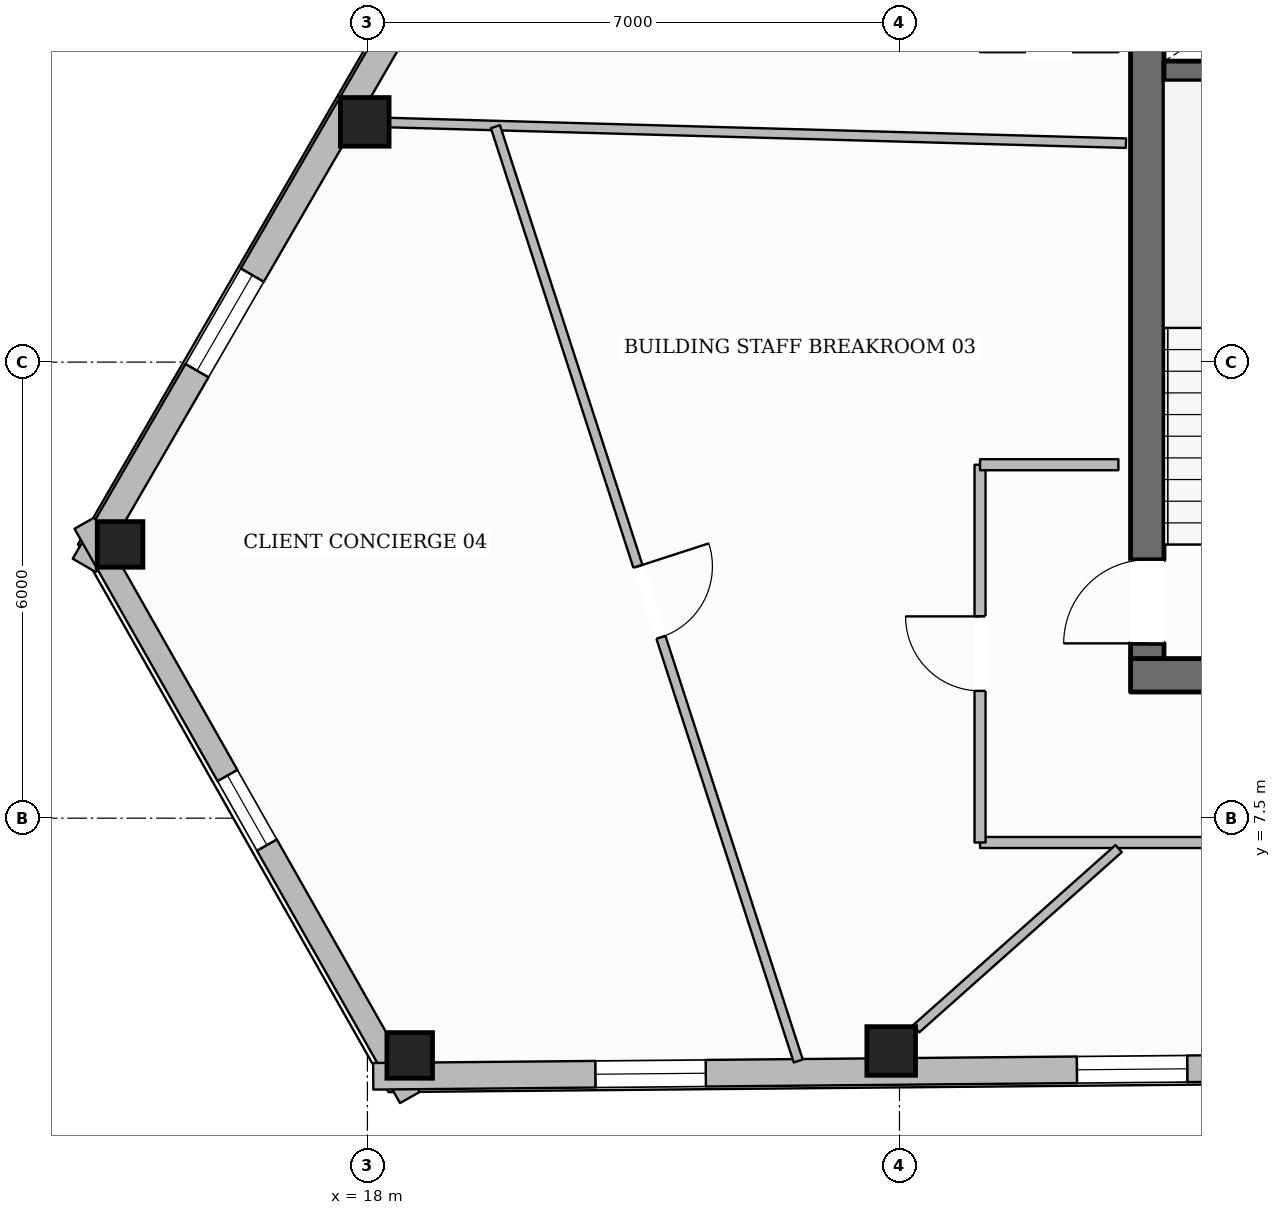
"""IFC4 building model, lengths in metres.
Left out: names, types, materials, properties, quantities, classifications, styles, units other than length and angle.
Written with IfcOpenShell. Run it as: python <this file> out.ifc"""

import sys

from ifc_helpers import new_model, si_unit, direction, frame, frame_2d, origin, origin_2d, place, context, subcontext, project, spatial, rectangle, hollow_rectangle, extrude, element, fill, save


model = new_model("IFC4")
c1 = context("Model", 3, precision=1e-05, world=origin(), true_north=direction((0.0, 1.0)))
c2 = subcontext(c1, "Body", "Model", "MODEL_VIEW")
j1 = project(units=[si_unit("LENGTHUNIT", "METRE"), si_unit("PLANEANGLEUNIT", "RADIAN")], contexts=[c1])
p1 = place(None, origin())
s1 = spatial("IfcSite", under=j1, at=p1, CompositionType="ELEMENT")
p2 = place(p1, origin())
s2 = spatial("IfcBuilding", under=s1, at=p2, CompositionType="ELEMENT")
p3 = place(p2, frame((0.0, 0.0, 222.75)))
s3 = spatial("IfcBuildingStorey", under=s2, at=p3, CompositionType="ELEMENT", Elevation=222.75)
p4 = place(p3, frame((28.04, 9.38, 0.0), z_axis=(0.0, 0.0, 1.0), x_axis=(1.0, 0.0, 0.0)))
e1 = element("IfcWall", 1, at=p4, inside=s3, PredefinedType="SOLIDWALL", context=c2, shape_type="SweptSolid", body=[
    extrude(rectangle(XDim=19.92, YDim=0.44, at=frame_2d((9.96, 0.0))), origin(), (0.0, 0.0, 1.0), 3.6),
])
p5 = place(p4, frame((10.46, 0.0, 0.0)))
e2 = element("IfcOpeningElement", 2, at=p5, cuts=e1, PredefinedType="OPENING", context=c2, shape_type="SweptSolid", body=[
    extrude(rectangle(XDim=1.4, YDim=2.2, at=frame_2d((0.7, 1.1))), frame((0.0, 0.23, 0.0), z_axis=(0.0, -1.0, 0.0), x_axis=(1.0, 0.0, 0.0)), (0.0, 0.0, 1.0), 0.46),
])
p6 = place(p3, frame((28.26, 9.6, 0.0), z_axis=(0.0, 0.0, 1.0), x_axis=(0.0, 1.0, 0.0)))
e3 = element("IfcWall", 3, at=p6, inside=s3, PredefinedType="SOLIDWALL", context=c2, shape_type="SweptSolid", body=[
    extrude(rectangle(XDim=13.0, YDim=0.44, at=frame_2d((6.5, 0.0))), origin(), (0.0, 0.0, 1.0), 3.6),
])
p7 = place(p6, frame((0.2, 0.0, 0.0)))
e4 = element("IfcOpeningElement", 4, at=p7, cuts=e3, PredefinedType="OPENING", context=c2, shape_type="SweptSolid", body=[
    extrude(rectangle(XDim=1.1, YDim=2.15, at=frame_2d((0.55, 1.075))), frame((0.0, 0.23, 0.0), z_axis=(0.0, -1.0, 0.0), x_axis=(1.0, 0.0, 0.0)), (0.0, 0.0, 1.0), 0.46),
])
p8 = place(p6, frame((8.4, 0.0, 0.0)))
e5 = element("IfcOpeningElement", 5, at=p8, cuts=e3, PredefinedType="OPENING", context=c2, shape_type="SweptSolid", body=[
    extrude(rectangle(XDim=0.9, YDim=2.1, at=frame_2d((0.45, 1.05))), frame((0.0, 0.23, 0.0), z_axis=(0.0, -1.0, 0.0), x_axis=(1.0, 0.0, 0.0)), (0.0, 0.0, 1.0), 0.46),
])
p9 = place(p3, frame((28.48, 17.33, 0.0), z_axis=(0.0, 0.0, 1.0), x_axis=(1.0, 0.0, 0.0)))
e6 = element("IfcWall", 6, at=p9, inside=s3, PredefinedType="SHEAR", context=c2, shape_type="SweptSolid", body=[
    extrude(rectangle(XDim=3.2, YDim=0.26, at=frame_2d((1.6, 0.0))), origin(), (0.0, 0.0, 1.0), 3.6),
])
p10 = place(p3, frame((17.965, 16.66, 0.0), z_axis=(0.0, 0.0, 1.0), x_axis=(1.0, 0.0, 0.0)))
e7 = element("IfcColumn", 7, at=p10, inside=s3, PredefinedType="COLUMN", context=c2, shape_type="SweptSolid", body=[
    extrude(hollow_rectangle(XDim=0.64, YDim=0.64, WallThickness=0.028, at=origin_2d()), origin(), (0.0, 0.0, 1.0), 3.6),
])
for number, where, z_axis, x_axis in (
    (8, (14.746, 11.102, 0.0), (0.0, 0.0, 1.0), (1.0, 0.0, 0.0)),
    (9, (18.557, 4.379, 0.0), (0.0, 0.0, 1.0), (1.0, 0.0, 0.0)),
):
    element("IfcColumn", number, at=place(p3, frame(where, z_axis=z_axis, x_axis=x_axis)), inside=s3, PredefinedType="COLUMN", context=c2, shape_type="SweptSolid", body=[
        extrude(hollow_rectangle(XDim=0.6, YDim=0.6, WallThickness=0.028, at=origin_2d()), origin(), (0.0, 0.0, 1.0), 3.6),
    ])
p11 = place(p3, frame((24.891, 4.437, 0.0), z_axis=(0.0, 0.0, 1.0), x_axis=(1.0, 0.0, 0.0)))
e10 = element("IfcColumn", 10, at=p11, inside=s3, PredefinedType="COLUMN", context=c2, shape_type="SweptSolid", body=[
    extrude(hollow_rectangle(XDim=0.64, YDim=0.64, WallThickness=0.028, at=origin_2d()), origin(), (0.0, 0.0, 1.0), 3.6),
])
p12 = place(p3, frame((14.274, 10.826, 0.0), z_axis=(0.0, 0.0, 1.0), x_axis=(0.501112789677, 0.865381980412, 0.0)))
e11 = element("IfcWall", 11, at=p12, inside=s3, PredefinedType="STANDARD", context=c2, shape_type="SweptSolid", body=[
    extrude(rectangle(XDim=39.491, YDim=0.35, at=frame_2d((19.745, 0.0))), origin(), (0.0, 0.0, 1.0), 3.132),
])
p13 = place(p12, frame((29.018, 0.0, 0.0)))
e12 = element("IfcOpeningElement", 12, at=p13, cuts=e11, PredefinedType="OPENING", context=c2, shape_type="SweptSolid", body=[
    extrude(rectangle(XDim=1.0, YDim=2.2, at=frame_2d((0.5, 1.1))), frame((0.0, 0.185, 0.0), z_axis=(0.0, -1.0, 0.0), x_axis=(1.0, 0.0, 0.0)), (0.0, 0.0, 1.0), 0.37),
])
p14 = place(p12, frame((35.08, 0.0, 0.65)))
e13 = element("IfcOpeningElement", 13, at=p14, cuts=e11, PredefinedType="OPENING", context=c2, shape_type="SweptSolid", body=[
    extrude(rectangle(XDim=1.45, YDim=1.75, at=frame_2d((0.725, 0.875))), frame((0.0, 0.185, 0.0), z_axis=(0.0, -1.0, 0.0), x_axis=(1.0, 0.0, 0.0)), (0.0, 0.0, 1.0), 0.37),
])
p15 = place(p12, frame((22.233, 0.0, 0.65)))
e14 = element("IfcOpeningElement", 14, at=p15, cuts=e11, PredefinedType="OPENING", context=c2, shape_type="SweptSolid", body=[
    extrude(rectangle(XDim=1.45, YDim=1.75, at=frame_2d((0.725, 0.875))), frame((0.0, 0.185, 0.0), z_axis=(0.0, -1.0, 0.0), x_axis=(1.0, 0.0, 0.0)), (0.0, 0.0, 1.0), 0.37),
])
p16 = place(p12, frame((9.385, 0.0, 0.65)))
e15 = element("IfcOpeningElement", 15, at=p16, cuts=e11, PredefinedType="OPENING", context=c2, shape_type="SweptSolid", body=[
    extrude(rectangle(XDim=1.45, YDim=1.75, at=frame_2d((0.725, 0.875))), frame((0.0, 0.185, 0.0), z_axis=(0.0, -1.0, 0.0), x_axis=(1.0, 0.0, 0.0)), (0.0, 0.0, 1.0), 0.37),
])
p17 = place(p12, frame((2.962, 0.0, 0.65)))
e16 = element("IfcOpeningElement", 16, at=p17, cuts=e11, PredefinedType="OPENING", context=c2, shape_type="SweptSolid", body=[
    extrude(rectangle(XDim=1.45, YDim=1.75, at=frame_2d((0.725, 0.875))), frame((0.0, 0.185, 0.0), z_axis=(0.0, -1.0, 0.0), x_axis=(1.0, 0.0, 0.0)), (0.0, 0.0, 1.0), 0.37),
])
p18 = place(p3, frame((18.56, 3.826, 0.0), z_axis=(0.0, 0.0, 1.0), x_axis=(-0.493102643732, 0.86997113903, 0.0)))
e17 = element("IfcWall", 17, at=p18, inside=s3, PredefinedType="STANDARD", context=c2, shape_type="SweptSolid", body=[
    extrude(rectangle(XDim=8.685, YDim=0.3, at=frame_2d((4.343, 0.0))), origin(), (0.0, 0.0, 1.0), 3.132),
])
p19 = place(p18, frame((3.818, 0.0, 0.65)))
e18 = element("IfcOpeningElement", 18, at=p19, cuts=e17, PredefinedType="OPENING", context=c2, shape_type="SweptSolid", body=[
    extrude(rectangle(XDim=1.05, YDim=1.7, at=frame_2d((0.525, 0.85))), frame((0.0, 0.16, 0.0), z_axis=(0.0, -1.0, 0.0), x_axis=(1.0, 0.0, 0.0)), (0.0, 0.0, 1.0), 0.32),
])
p20 = place(p3, frame((57.038, 4.464, 0.0), z_axis=(0.0, 0.0, 1.0), x_axis=(-0.999957405044, -0.009229739812, 0.0)))
e19 = element("IfcWall", 19, at=p20, inside=s3, PredefinedType="STANDARD", context=c2, shape_type="SweptSolid", body=[
    extrude(rectangle(XDim=38.963, YDim=0.35, at=frame_2d((19.481, 0.0))), origin(), (0.0, 0.0, 1.0), 3.132),
])
p21 = place(p20, frame((34.588, 0.0, 0.65)))
e20 = element("IfcOpeningElement", 20, at=p21, cuts=e19, PredefinedType="OPENING", context=c2, shape_type="SweptSolid", body=[
    extrude(rectangle(XDim=1.45, YDim=1.75, at=frame_2d((0.725, 0.875))), frame((0.0, 0.185, 0.0), z_axis=(0.0, -1.0, 0.0), x_axis=(1.0, 0.0, 0.0)), (0.0, 0.0, 1.0), 0.37),
])
p22 = place(p20, frame((28.254, 0.0, 0.65)))
e21 = element("IfcOpeningElement", 21, at=p22, cuts=e19, PredefinedType="OPENING", context=c2, shape_type="SweptSolid", body=[
    extrude(rectangle(XDim=1.45, YDim=1.75, at=frame_2d((0.725, 0.875))), frame((0.0, 0.185, 0.0), z_axis=(0.0, -1.0, 0.0), x_axis=(1.0, 0.0, 0.0)), (0.0, 0.0, 1.0), 0.37),
])
p23 = place(p20, frame((21.919, 0.0, 0.65)))
e22 = element("IfcOpeningElement", 22, at=p23, cuts=e19, PredefinedType="OPENING", context=c2, shape_type="SweptSolid", body=[
    extrude(rectangle(XDim=1.45, YDim=1.75, at=frame_2d((0.725, 0.875))), frame((0.0, 0.185, 0.0), z_axis=(0.0, -1.0, 0.0), x_axis=(1.0, 0.0, 0.0)), (0.0, 0.0, 1.0), 0.37),
])
p24 = place(p20, frame((9.25, 0.0, 0.65)))
e23 = element("IfcOpeningElement", 23, at=p24, cuts=e19, PredefinedType="OPENING", context=c2, shape_type="SweptSolid", body=[
    extrude(rectangle(XDim=1.45, YDim=1.75, at=frame_2d((0.725, 0.875))), frame((0.0, 0.185, 0.0), z_axis=(0.0, -1.0, 0.0), x_axis=(1.0, 0.0, 0.0)), (0.0, 0.0, 1.0), 0.37),
])
p25 = place(p20, frame((2.916, 0.0, 0.65)))
e24 = element("IfcOpeningElement", 24, at=p25, cuts=e19, PredefinedType="OPENING", context=c2, shape_type="SweptSolid", body=[
    extrude(rectangle(XDim=1.45, YDim=1.75, at=frame_2d((0.725, 0.875))), frame((0.0, 0.185, 0.0), z_axis=(0.0, -1.0, 0.0), x_axis=(1.0, 0.0, 0.0)), (0.0, 0.0, 1.0), 0.37),
])
p26 = place(p3, frame((49.94, 7.18, 0.0), z_axis=(0.0, 0.0, 1.0), x_axis=(-1.0, 0.0, 0.0)))
e25 = element("IfcWall", 25, at=p26, inside=s3, PredefinedType="PARTITIONING", context=c2, shape_type="SweptSolid", body=[
    extrude(rectangle(XDim=23.88, YDim=0.145, at=frame_2d((11.94, 0.0))), origin(), (0.0, 0.0, 1.0), 3.339),
])
p27 = place(p26, frame((14.157, 0.0, 0.0)))
e26 = element("IfcOpeningElement", 26, at=p27, cuts=e25, PredefinedType="OPENING", context=c2, shape_type="SweptSolid", body=[
    extrude(rectangle(XDim=0.98, YDim=2.15, at=frame_2d((0.49, 1.075))), frame((0.0, 0.083, 0.0), z_axis=(0.0, -1.0, 0.0), x_axis=(1.0, 0.0, 0.0)), (0.0, 0.0, 1.0), 0.165),
])
p28 = place(p26, frame((3.056, 0.0, 0.0)))
e27 = element("IfcOpeningElement", 27, at=p28, cuts=e25, PredefinedType="OPENING", context=c2, shape_type="SweptSolid", body=[
    extrude(rectangle(XDim=0.98, YDim=2.15, at=frame_2d((0.49, 1.075))), frame((0.0, 0.083, 0.0), z_axis=(0.0, -1.0, 0.0), x_axis=(1.0, 0.0, 0.0)), (0.0, 0.0, 1.0), 0.165),
])
p29 = place(p3, frame((26.06, 7.18, 0.0), z_axis=(0.0, 0.0, 1.0), x_axis=(0.0, 1.0, 0.0)))
e28 = element("IfcWall", 28, at=p29, inside=s3, PredefinedType="PARTITIONING", context=c2, shape_type="SweptSolid", body=[
    extrude(rectangle(XDim=4.97, YDim=0.145, at=frame_2d((2.485, 0.0))), origin(), (0.0, 0.0, 1.0), 3.6),
])
p30 = place(p29, frame((1.995, 0.0, 0.0)))
e29 = element("IfcOpeningElement", 29, at=p30, cuts=e28, PredefinedType="OPENING", context=c2, shape_type="SweptSolid", body=[
    extrude(rectangle(XDim=0.98, YDim=2.15, at=frame_2d((0.49, 1.075))), frame((0.0, 0.083, 0.0), z_axis=(0.0, -1.0, 0.0), x_axis=(1.0, 0.0, 0.0)), (0.0, 0.0, 1.0), 0.165),
])
p31 = place(p3, frame((26.06, 12.15, 0.0), z_axis=(0.0, 0.0, 1.0), x_axis=(1.0, 0.0, 0.0)))
e30 = element("IfcWall", 30, at=p31, inside=s3, PredefinedType="PARTITIONING", context=c2, shape_type="SweptSolid", body=[
    extrude(rectangle(XDim=1.82, YDim=0.145, at=frame_2d((0.91, 0.0))), origin(), (0.0, 0.0, 1.0), 3.6),
])
p32 = place(p3, frame((27.98, 16.38, 0.0), z_axis=(0.0, 0.0, 1.0), x_axis=(-0.999608903911, 0.027964964169, 0.0)))
e31 = element("IfcWall", 31, at=p32, inside=s3, PredefinedType="PARTITIONING", context=c2, shape_type="SweptSolid", body=[
    extrude(rectangle(XDim=9.691, YDim=0.125, at=frame_2d((4.845, 0.0))), origin(), (0.0, 0.0, 1.0), 3.141),
])
p33 = place(p3, frame((27.883, 7.1, 0.0), z_axis=(0.0, 0.0, 1.0), x_axis=(-0.747084406965, -0.664729184608, 0.0)))
e32 = element("IfcWall", 32, at=p33, inside=s3, PredefinedType="PARTITIONING", context=c2, shape_type="SweptSolid", body=[
    extrude(rectangle(XDim=3.566, YDim=0.125, at=frame_2d((1.783, 0.0))), origin(), (0.0, 0.0, 1.0), 3.6),
])
p34 = place(p3, frame((19.684, 16.597, 0.0), z_axis=(0.0, 0.0, 1.0), x_axis=(0.308326334122, -0.951280648225, 0.0)))
e33 = element("IfcWall", 33, at=p34, inside=s3, PredefinedType="PARTITIONING", context=c2, shape_type="SweptSolid", body=[
    extrude(rectangle(XDim=12.921, YDim=0.125, at=frame_2d((6.46, 0.0))), origin(), (0.0, 0.0, 1.0), 3.339),
])
p35 = place(p34, frame((6.081, 0.0, 0.0)))
e34 = element("IfcOpeningElement", 34, at=p35, cuts=e33, PredefinedType="OPENING", context=c2, shape_type="SweptSolid", body=[
    extrude(rectangle(XDim=0.98, YDim=2.15, at=frame_2d((0.49, 1.075))), frame((0.0, 0.073, 0.0), z_axis=(0.0, -1.0, 0.0), x_axis=(1.0, 0.0, 0.0)), (0.0, 0.0, 1.0), 0.145),
])
p36 = place(p17, origin())
e35 = element("IfcWindow", 35, at=p36, inside=s3, PartitioningType="SINGLE_PANEL", PredefinedType="WINDOW", context=c2, shape_type="SweptSolid", body=[
    extrude(rectangle(XDim=1.45, YDim=1.75, at=frame_2d((0.725, 0.875))), frame((0.0, 0.03, 0.0), z_axis=(0.0, -1.0, 0.0), x_axis=(1.0, 0.0, 0.0)), (0.0, 0.0, 1.0), 0.06),
])
fill(e16, e35)
p37 = place(p21, origin())
e36 = element("IfcWindow", 36, at=p37, inside=s3, PartitioningType="SINGLE_PANEL", PredefinedType="WINDOW", context=c2, shape_type="SweptSolid", body=[
    extrude(rectangle(XDim=1.45, YDim=1.75, at=frame_2d((0.725, 0.875))), frame((0.0, 0.03, 0.0), z_axis=(0.0, -1.0, 0.0), x_axis=(1.0, 0.0, 0.0)), (0.0, 0.0, 1.0), 0.06),
])
fill(e20, e36)
p38 = place(p22, origin())
e37 = element("IfcWindow", 37, at=p38, inside=s3, PartitioningType="SINGLE_PANEL", PredefinedType="WINDOW", context=c2, shape_type="SweptSolid", body=[
    extrude(rectangle(XDim=1.45, YDim=1.75, at=frame_2d((0.725, 0.875))), frame((0.0, 0.03, 0.0), z_axis=(0.0, -1.0, 0.0), x_axis=(1.0, 0.0, 0.0)), (0.0, 0.0, 1.0), 0.06),
])
fill(e21, e37)
p39 = place(p19, origin())
e38 = element("IfcWindow", 38, at=p39, inside=s3, PartitioningType="SINGLE_PANEL", PredefinedType="WINDOW", context=c2, shape_type="SweptSolid", body=[
    extrude(rectangle(XDim=1.05, YDim=1.7, at=frame_2d((0.525, 0.85))), frame((0.0, 0.03, 0.0), z_axis=(0.0, -1.0, 0.0), x_axis=(1.0, 0.0, 0.0)), (0.0, 0.0, 1.0), 0.06),
])
fill(e18, e38)
p40 = place(p7, origin())
e39 = element("IfcDoor", 39, at=p40, inside=s3, OperationType="SINGLE_SWING_LEFT", PredefinedType="DOOR", context=c2, shape_type="SweptSolid", body=[
    extrude(rectangle(XDim=1.1, YDim=2.15, at=frame_2d((0.55, 1.075))), frame((0.0, 0.025, 0.0), z_axis=(0.0, -1.0, 0.0), x_axis=(1.0, 0.0, 0.0)), (0.0, 0.0, 1.0), 0.05),
])
fill(e4, e39)
p41 = place(p30, origin())
e40 = element("IfcDoor", 40, at=p41, inside=s3, OperationType="SINGLE_SWING_RIGHT", PredefinedType="DOOR", context=c2, shape_type="SweptSolid", body=[
    extrude(rectangle(XDim=0.98, YDim=2.15, at=frame_2d((0.49, 1.075))), frame((0.0, 0.025, 0.0), z_axis=(0.0, -1.0, 0.0), x_axis=(1.0, 0.0, 0.0)), (0.0, 0.0, 1.0), 0.05),
])
fill(e29, e40)
p42 = place(p35, origin())
e41 = element("IfcDoor", 41, at=p42, inside=s3, OperationType="SINGLE_SWING_LEFT", PredefinedType="DOOR", context=c2, shape_type="SweptSolid", body=[
    extrude(rectangle(XDim=0.98, YDim=2.15, at=frame_2d((0.49, 1.075))), frame((0.0, 0.025, 0.0), z_axis=(0.0, -1.0, 0.0), x_axis=(1.0, 0.0, 0.0)), (0.0, 0.0, 1.0), 0.05),
])
fill(e34, e41)
save(model, sys.argv[1])
